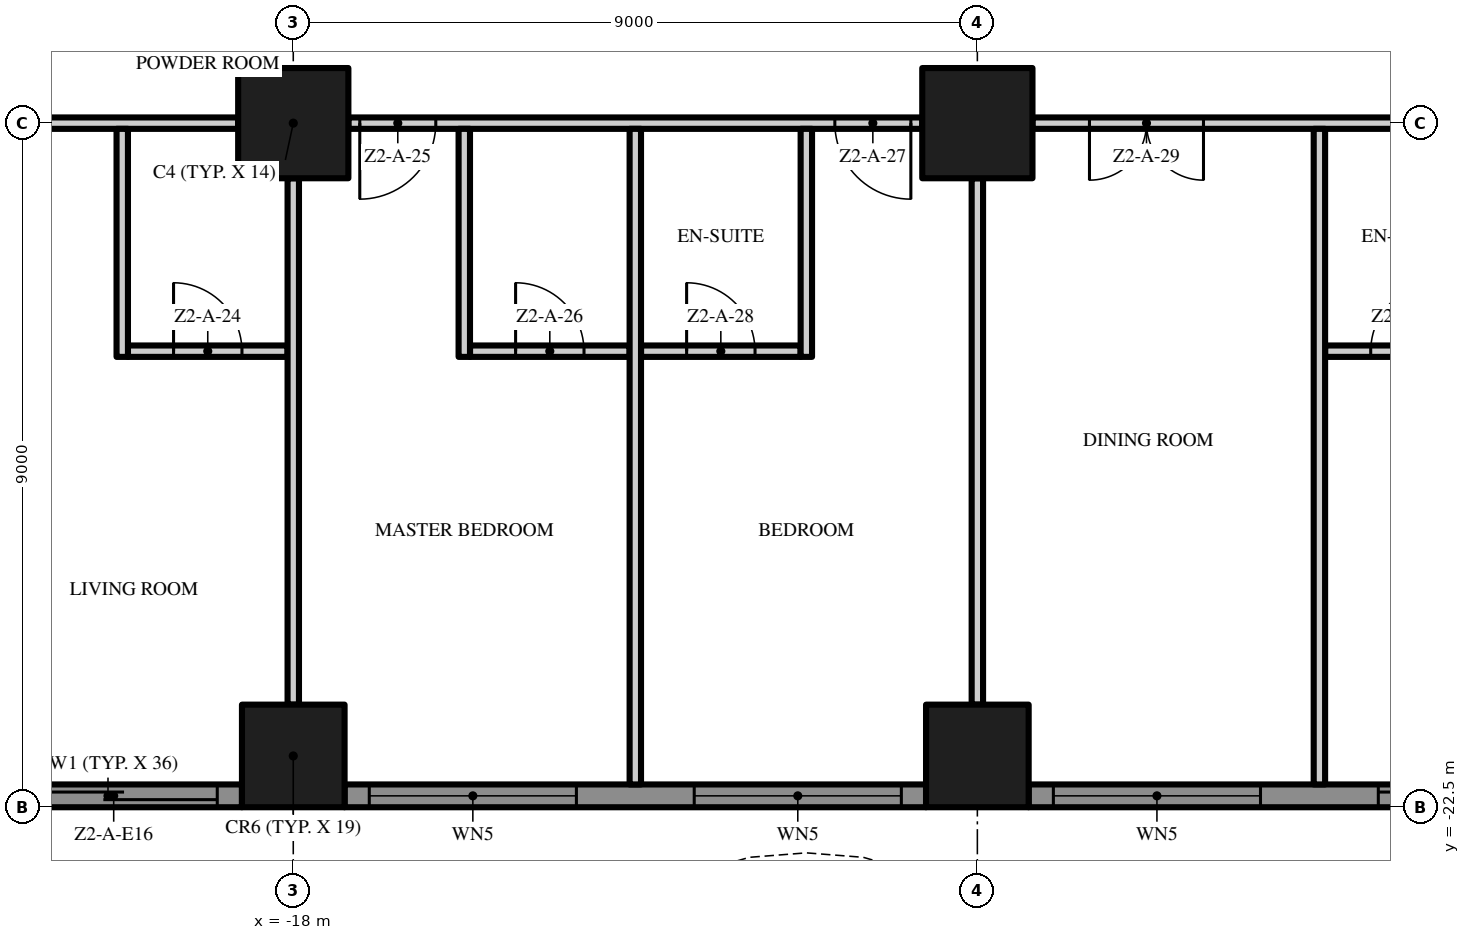
"""IFC4 building model, lengths in metres.
Left out: names, types, materials, properties, quantities, classifications, styles, units other than length and angle.
Written with IfcOpenShell. Run it as: python <this file> out.ifc"""

import sys

from ifc_helpers import new_model, si_unit, direction, frame, frame_2d, origin, origin_2d, place, context, subcontext, project, spatial, polyline, rectangle, outline, extrude, element, fill, save


model = new_model("IFC4")
c1 = context("Model", 3, precision=1e-05, world=origin(), true_north=direction((0.0, 1.0)))
c2 = subcontext(c1, "Body", "Model", "MODEL_VIEW")
j1 = project(units=[si_unit("LENGTHUNIT", "METRE"), si_unit("PLANEANGLEUNIT", "RADIAN")], contexts=[c1])
p1 = place(None, origin())
s1 = spatial("IfcSite", under=j1, at=p1, CompositionType="ELEMENT")
p2 = place(p1, origin())
s2 = spatial("IfcBuilding", under=s1, at=p2, CompositionType="ELEMENT")
p3 = place(p2, frame((0.0, 0.0, 77.0)))
s3 = spatial("IfcBuildingStorey", under=s2, at=p3, CompositionType="ELEMENT", Elevation=77.0)
p4 = place(p3, frame((-18.0, -13.5, 0.0), z_axis=(0.0, 0.0, 1.0), x_axis=(1.0, 0.0, 0.0)))
e1 = element("IfcColumn", 1, at=p4, inside=s3, PredefinedType="COLUMN", context=c2, shape_type="SweptSolid", body=[
    extrude(rectangle(XDim=1.45, YDim=1.45, at=origin_2d()), origin(), (0.0, 0.0, 1.0), 3.5),
])
p5 = place(p3, frame((-18.0, -21.825, 0.0), z_axis=(0.0, 0.0, 1.0), x_axis=(1.0, 0.0, 0.0)))
e2 = element("IfcColumn", 2, at=p5, inside=s3, PredefinedType="COLUMN", context=c2, shape_type="SweptSolid", body=[
    extrude(rectangle(XDim=1.35, YDim=1.35, at=origin_2d()), origin(), (0.0, 0.0, 1.0), 3.5),
])
p6 = place(p3, frame((-9.0, -13.5, 0.0), z_axis=(0.0, 0.0, 1.0), x_axis=(1.0, 0.0, 0.0)))
e3 = element("IfcColumn", 3, at=p6, inside=s3, PredefinedType="COLUMN", context=c2, shape_type="SweptSolid", body=[
    extrude(rectangle(XDim=1.45, YDim=1.45, at=origin_2d()), origin(), (0.0, 0.0, 1.0), 3.5),
])
p7 = place(p3, frame((-9.0, -21.825, 0.0), z_axis=(0.0, 0.0, 1.0), x_axis=(1.0, 0.0, 0.0)))
e4 = element("IfcColumn", 4, at=p7, inside=s3, PredefinedType="COLUMN", context=c2, shape_type="SweptSolid", body=[
    extrude(rectangle(XDim=1.35, YDim=1.35, at=origin_2d()), origin(), (0.0, 0.0, 1.0), 3.5),
])
p8 = place(p3, frame((-18.675, -22.35, 0.0), z_axis=(0.0, 0.0, 1.0), x_axis=(-1.0, 0.0, 0.0)))
e5 = element("IfcWall", 5, at=p8, inside=s3, PredefinedType="SOLIDWALL", context=c2, shape_type="SweptSolid", body=[
    extrude(rectangle(XDim=3.525, YDim=0.3, at=frame_2d((1.762, 0.0))), origin(), (0.0, 0.0, 1.0), 3.5),
])
p9 = place(p8, frame((0.325, 0.0, 0.0)))
e6 = element("IfcOpeningElement", 6, at=p9, cuts=e5, PredefinedType="OPENING", context=c2, shape_type="SweptSolid", body=[
    extrude(rectangle(XDim=2.725, YDim=2.4, at=frame_2d((1.363, 1.2))), frame((0.0, 0.16, 0.0), z_axis=(0.0, -1.0, 0.0), x_axis=(1.0, 0.0, 0.0)), (0.0, 0.0, 1.0), 0.32),
])
p10 = place(p3, frame((-9.675, -22.35, 0.0), z_axis=(0.0, 0.0, 1.0), x_axis=(-1.0, 0.0, 0.0)))
e7 = element("IfcWall", 7, at=p10, inside=s3, PredefinedType="SOLIDWALL", context=c2, shape_type="SweptSolid", body=[
    extrude(rectangle(XDim=7.65, YDim=0.3, at=frame_2d((3.825, 0.0))), origin(), (0.0, 0.0, 1.0), 3.5),
])
p11 = place(p10, frame((4.6, 0.0, 0.45)))
e8 = element("IfcOpeningElement", 8, at=p11, cuts=e7, PredefinedType="OPENING", context=c2, shape_type="SweptSolid", body=[
    extrude(rectangle(XDim=2.725, YDim=2.65, at=frame_2d((1.363, 1.325))), frame((0.0, 0.16, 0.0), z_axis=(0.0, -1.0, 0.0), x_axis=(1.0, 0.0, 0.0)), (0.0, 0.0, 1.0), 0.32),
])
p12 = place(p10, frame((0.325, 0.0, 0.45)))
e9 = element("IfcOpeningElement", 9, at=p12, cuts=e7, PredefinedType="OPENING", context=c2, shape_type="SweptSolid", body=[
    extrude(rectangle(XDim=2.725, YDim=2.65, at=frame_2d((1.363, 1.325))), frame((0.0, 0.16, 0.0), z_axis=(0.0, -1.0, 0.0), x_axis=(1.0, 0.0, 0.0)), (0.0, 0.0, 1.0), 0.32),
])
p13 = place(p3, frame((-0.675, -22.35, 0.0), z_axis=(0.0, 0.0, 1.0), x_axis=(-1.0, 0.0, 0.0)))
e10 = element("IfcWall", 10, at=p13, inside=s3, PredefinedType="SOLIDWALL", context=c2, shape_type="SweptSolid", body=[
    extrude(rectangle(XDim=7.65, YDim=0.3, at=frame_2d((3.825, 0.0))), origin(), (0.0, 0.0, 1.0), 3.5),
])
p14 = place(p13, frame((4.6, 0.0, 0.45)))
e11 = element("IfcOpeningElement", 11, at=p14, cuts=e10, PredefinedType="OPENING", context=c2, shape_type="SweptSolid", body=[
    extrude(rectangle(XDim=2.725, YDim=2.65, at=frame_2d((1.363, 1.325))), frame((0.0, 0.16, 0.0), z_axis=(0.0, -1.0, 0.0), x_axis=(1.0, 0.0, 0.0)), (0.0, 0.0, 1.0), 0.32),
])
p15 = place(p13, frame((0.325, 0.0, 0.0)))
e12 = element("IfcOpeningElement", 12, at=p15, cuts=e10, PredefinedType="OPENING", context=c2, shape_type="SweptSolid", body=[
    extrude(rectangle(XDim=2.725, YDim=2.4, at=frame_2d((1.363, 1.2))), frame((0.0, 0.16, 0.0), z_axis=(0.0, -1.0, 0.0), x_axis=(1.0, 0.0, 0.0)), (0.0, 0.0, 1.0), 0.32),
])
p16 = place(p3, origin())
e13 = element("IfcWall", 13, at=p16, inside=s3, PredefinedType="USERDEFINED", context=c2, shape_type="SweptSolid", body=[
    extrude(outline(polyline([(-22.5, -24.3), (-21.0, -25.005), (-19.5, -25.441), (-18.75, -25.5), (-18.0, -25.441), (-16.5, -25.005), (-15.0, -24.3), (-13.5, -23.595), (-12.0, -23.159), (-11.25, -23.1), (-10.5, -23.159), (-9.0, -23.595), (-7.5, -24.3), (-6.0, -25.005), (-4.5, -25.441), (-3.75, -25.5), (-3.0, -25.441), (-1.5, -25.005), (0.0, -24.3), (1.5, -23.595), (3.0, -23.159), (3.75, -23.1), (4.5, -23.159), (6.0, -23.595), (7.5, -24.3), (9.0, -25.005), (10.5, -25.441), (11.25, -25.5), (12.0, -25.441), (13.5, -25.005), (15.0, -24.3), (16.5, -23.595), (18.0, -23.159), (18.75, -23.1), (19.5, -23.159), (21.0, -23.595), (22.5, -24.3), (22.606, -24.074), (21.089, -23.36), (19.545, -22.911), (18.75, -22.849), (17.955, -22.911), (16.411, -23.36), (14.894, -24.074), (13.411, -24.771), (11.955, -25.194), (11.25, -25.249), (10.545, -25.194), (9.089, -24.771), (7.606, -24.074), (6.089, -23.36), (4.545, -22.911), (3.75, -22.849), (2.955, -22.911), (1.411, -23.36), (-0.106, -24.074), (-1.589, -24.771), (-3.045, -25.194), (-3.75, -25.249), (-4.455, -25.194), (-5.911, -24.771), (-7.394, -24.074), (-8.911, -23.36), (-10.455, -22.911), (-11.25, -22.849), (-12.045, -22.911), (-13.589, -23.36), (-15.106, -24.074), (-16.589, -24.771), (-18.045, -25.194), (-18.75, -25.249), (-19.455, -25.194), (-20.911, -24.771), (-22.394, -24.074), (-22.5, -24.3)])), origin(), (0.0, 0.0, 1.0), 0.9),
])
p17 = place(p3, frame((-20.175, -16.5, 0.0), z_axis=(0.0, 0.0, 1.0), x_axis=(1.0, 0.0, 0.0)))
e14 = element("IfcWall", 14, at=p17, inside=s3, PredefinedType="PARTITIONING", context=c2, shape_type="SweptSolid", body=[
    extrude(rectangle(XDim=2.1, YDim=0.15, at=frame_2d((1.05, 0.0))), origin(), (0.0, 0.0, 1.0), 3.5),
])
p18 = place(p17, frame((0.6, 0.0, 0.0)))
e15 = element("IfcOpeningElement", 15, at=p18, cuts=e14, PredefinedType="OPENING", context=c2, shape_type="SweptSolid", body=[
    extrude(rectangle(XDim=0.9, YDim=2.1, at=frame_2d((0.45, 1.05))), frame((0.0, 0.085, 0.0), z_axis=(0.0, -1.0, 0.0), x_axis=(1.0, 0.0, 0.0)), (0.0, 0.0, 1.0), 0.17),
])
p19 = place(p3, frame((-15.675, -16.5, 0.0), z_axis=(0.0, 0.0, 1.0), x_axis=(1.0, 0.0, 0.0)))
e16 = element("IfcWall", 16, at=p19, inside=s3, PredefinedType="PARTITIONING", context=c2, shape_type="SweptSolid", body=[
    extrude(rectangle(XDim=2.1, YDim=0.15, at=frame_2d((1.05, 0.0))), origin(), (0.0, 0.0, 1.0), 3.5),
])
p20 = place(p19, frame((0.6, 0.0, 0.0)))
e17 = element("IfcOpeningElement", 17, at=p20, cuts=e16, PredefinedType="OPENING", context=c2, shape_type="SweptSolid", body=[
    extrude(rectangle(XDim=0.9, YDim=2.1, at=frame_2d((0.45, 1.05))), frame((0.0, 0.085, 0.0), z_axis=(0.0, -1.0, 0.0), x_axis=(1.0, 0.0, 0.0)), (0.0, 0.0, 1.0), 0.17),
])
p21 = place(p3, frame((-13.425, -16.5, 0.0), z_axis=(0.0, 0.0, 1.0), x_axis=(1.0, 0.0, 0.0)))
e18 = element("IfcWall", 18, at=p21, inside=s3, PredefinedType="PARTITIONING", context=c2, shape_type="SweptSolid", body=[
    extrude(rectangle(XDim=2.1, YDim=0.15, at=frame_2d((1.05, 0.0))), origin(), (0.0, 0.0, 1.0), 3.5),
])
p22 = place(p21, frame((0.6, 0.0, 0.0)))
e19 = element("IfcOpeningElement", 19, at=p22, cuts=e18, PredefinedType="OPENING", context=c2, shape_type="SweptSolid", body=[
    extrude(rectangle(XDim=0.9, YDim=2.1, at=frame_2d((0.45, 1.05))), frame((0.0, 0.085, 0.0), z_axis=(0.0, -1.0, 0.0), x_axis=(1.0, 0.0, 0.0)), (0.0, 0.0, 1.0), 0.17),
])
p23 = place(p3, frame((-4.425, -16.5, 0.0), z_axis=(0.0, 0.0, 1.0), x_axis=(1.0, 0.0, 0.0)))
e20 = element("IfcWall", 20, at=p23, inside=s3, PredefinedType="PARTITIONING", context=c2, shape_type="SweptSolid", body=[
    extrude(rectangle(XDim=2.1, YDim=0.15, at=frame_2d((1.05, 0.0))), origin(), (0.0, 0.0, 1.0), 3.5),
])
p24 = place(p23, frame((0.6, 0.0, 0.0)))
e21 = element("IfcOpeningElement", 21, at=p24, cuts=e20, PredefinedType="OPENING", context=c2, shape_type="SweptSolid", body=[
    extrude(rectangle(XDim=0.9, YDim=2.1, at=frame_2d((0.45, 1.05))), frame((0.0, 0.085, 0.0), z_axis=(0.0, -1.0, 0.0), x_axis=(1.0, 0.0, 0.0)), (0.0, 0.0, 1.0), 0.17),
])
p25 = place(p3, frame((-18.725, -13.5, 0.0), z_axis=(0.0, 0.0, 1.0), x_axis=(-1.0, 0.0, 0.0)))
e22 = element("IfcWall", 22, at=p25, inside=s3, PredefinedType="PARTITIONING", context=c2, shape_type="SweptSolid", body=[
    extrude(rectangle(XDim=6.925, YDim=0.15, at=frame_2d((3.462, 0.0))), origin(), (0.0, 0.0, 1.0), 3.5),
])
p26 = place(p25, frame((4.025, 0.0, 0.0)))
e23 = element("IfcOpeningElement", 23, at=p26, cuts=e22, PredefinedType="OPENING", context=c2, shape_type="SweptSolid", body=[
    extrude(rectangle(XDim=1.8, YDim=2.4, at=frame_2d((0.9, 1.2))), frame((0.0, 0.085, 0.0), z_axis=(0.0, -1.0, 0.0), x_axis=(1.0, 0.0, 0.0)), (0.0, 0.0, 1.0), 0.17),
])
p27 = place(p3, frame((-9.725, -13.5, 0.0), z_axis=(0.0, 0.0, 1.0), x_axis=(-1.0, 0.0, 0.0)))
e24 = element("IfcWall", 24, at=p27, inside=s3, PredefinedType="PARTITIONING", context=c2, shape_type="SweptSolid", body=[
    extrude(rectangle(XDim=7.55, YDim=0.15, at=frame_2d((3.775, 0.0))), origin(), (0.0, 0.0, 1.0), 3.5),
])
p28 = place(p27, frame((6.4, 0.0, 0.0)))
e25 = element("IfcOpeningElement", 25, at=p28, cuts=e24, PredefinedType="OPENING", context=c2, shape_type="SweptSolid", body=[
    extrude(rectangle(XDim=1.0, YDim=2.4, at=frame_2d((0.5, 1.2))), frame((0.0, 0.085, 0.0), z_axis=(0.0, -1.0, 0.0), x_axis=(1.0, 0.0, 0.0)), (0.0, 0.0, 1.0), 0.17),
])
p29 = place(p27, frame((0.15, 0.0, 0.0)))
e26 = element("IfcOpeningElement", 26, at=p29, cuts=e24, PredefinedType="OPENING", context=c2, shape_type="SweptSolid", body=[
    extrude(rectangle(XDim=1.0, YDim=2.4, at=frame_2d((0.5, 1.2))), frame((0.0, 0.085, 0.0), z_axis=(0.0, -1.0, 0.0), x_axis=(1.0, 0.0, 0.0)), (0.0, 0.0, 1.0), 0.17),
])
p30 = place(p3, frame((-0.725, -13.5, 0.0), z_axis=(0.0, 0.0, 1.0), x_axis=(-1.0, 0.0, 0.0)))
e27 = element("IfcWall", 27, at=p30, inside=s3, PredefinedType="PARTITIONING", context=c2, shape_type="SweptSolid", body=[
    extrude(rectangle(XDim=7.55, YDim=0.15, at=frame_2d((3.775, 0.0))), origin(), (0.0, 0.0, 1.0), 3.5),
])
p31 = place(p30, frame((5.3, 0.0, 0.0)))
e28 = element("IfcOpeningElement", 28, at=p31, cuts=e27, PredefinedType="OPENING", context=c2, shape_type="SweptSolid", body=[
    extrude(rectangle(XDim=1.5, YDim=2.4, at=frame_2d((0.75, 1.2))), frame((0.0, 0.085, 0.0), z_axis=(0.0, -1.0, 0.0), x_axis=(1.0, 0.0, 0.0)), (0.0, 0.0, 1.0), 0.17),
])
p32 = place(p30, frame((0.15, 0.0, 0.0)))
e29 = element("IfcOpeningElement", 29, at=p32, cuts=e27, PredefinedType="OPENING", context=c2, shape_type="SweptSolid", body=[
    extrude(rectangle(XDim=1.0, YDim=2.4, at=frame_2d((0.5, 1.2))), frame((0.0, 0.085, 0.0), z_axis=(0.0, -1.0, 0.0), x_axis=(1.0, 0.0, 0.0)), (0.0, 0.0, 1.0), 0.17),
])
p33 = place(p3, frame((-20.25, -16.575, 0.0), z_axis=(0.0, 0.0, 1.0), x_axis=(0.0, 1.0, 0.0)))
e30 = element("IfcWall", 30, at=p33, inside=s3, PredefinedType="PARTITIONING", context=c2, shape_type="SweptSolid", body=[
    extrude(rectangle(XDim=3.0, YDim=0.15, at=frame_2d((1.5, 0.0))), origin(), (0.0, 0.0, 1.0), 3.5),
])
p34 = place(p3, frame((-18.0, -21.15, 0.0), z_axis=(0.0, 0.0, 1.0), x_axis=(0.0, 1.0, 0.0)))
e31 = element("IfcWall", 31, at=p34, inside=s3, PredefinedType="PARTITIONING", context=c2, shape_type="SweptSolid", body=[
    extrude(rectangle(XDim=6.925, YDim=0.15, at=frame_2d((3.462, 0.0))), origin(), (0.0, 0.0, 1.0), 3.5),
])
p35 = place(p3, frame((-15.75, -16.575, 0.0), z_axis=(0.0, 0.0, 1.0), x_axis=(0.0, 1.0, 0.0)))
e32 = element("IfcWall", 32, at=p35, inside=s3, PredefinedType="PARTITIONING", context=c2, shape_type="SweptSolid", body=[
    extrude(rectangle(XDim=3.0, YDim=0.15, at=frame_2d((1.5, 0.0))), origin(), (0.0, 0.0, 1.0), 3.5),
])
p36 = place(p3, frame((-13.5, -22.2, 0.0), z_axis=(0.0, 0.0, 1.0), x_axis=(0.0, 1.0, 0.0)))
e33 = element("IfcWall", 33, at=p36, inside=s3, PredefinedType="PARTITIONING", context=c2, shape_type="SweptSolid", body=[
    extrude(rectangle(XDim=8.625, YDim=0.15, at=frame_2d((4.312, 0.0))), origin(), (0.0, 0.0, 1.0), 3.5),
])
p37 = place(p3, frame((-11.25, -16.575, 0.0), z_axis=(0.0, 0.0, 1.0), x_axis=(0.0, 1.0, 0.0)))
e34 = element("IfcWall", 34, at=p37, inside=s3, PredefinedType="PARTITIONING", context=c2, shape_type="SweptSolid", body=[
    extrude(rectangle(XDim=3.0, YDim=0.15, at=frame_2d((1.5, 0.0))), origin(), (0.0, 0.0, 1.0), 3.5),
])
p38 = place(p3, frame((-9.0, -21.15, 0.0), z_axis=(0.0, 0.0, 1.0), x_axis=(0.0, 1.0, 0.0)))
e35 = element("IfcWall", 35, at=p38, inside=s3, PredefinedType="PARTITIONING", context=c2, shape_type="SweptSolid", body=[
    extrude(rectangle(XDim=6.925, YDim=0.15, at=frame_2d((3.462, 0.0))), origin(), (0.0, 0.0, 1.0), 3.5),
])
p39 = place(p3, frame((-4.5, -22.2, 0.0), z_axis=(0.0, 0.0, 1.0), x_axis=(0.0, 1.0, 0.0)))
e36 = element("IfcWall", 36, at=p39, inside=s3, PredefinedType="PARTITIONING", context=c2, shape_type="SweptSolid", body=[
    extrude(rectangle(XDim=8.625, YDim=0.15, at=frame_2d((4.312, 0.0))), origin(), (0.0, 0.0, 1.0), 3.5),
])
p40 = place(p9, origin())
e37 = element("IfcDoor", 37, at=p40, inside=s3, OperationType="SINGLE_SWING_LEFT", PredefinedType="DOOR", context=c2, shape_type="SweptSolid", body=[
    extrude(rectangle(XDim=2.725, YDim=2.4, at=frame_2d((1.363, 1.2))), frame((0.0, 0.025, 0.0), z_axis=(0.0, -1.0, 0.0), x_axis=(1.0, 0.0, 0.0)), (0.0, 0.0, 1.0), 0.05),
])
fill(e6, e37)
p41 = place(p11, origin())
e38 = element("IfcWindow", 38, at=p41, inside=s3, PartitioningType="SINGLE_PANEL", PredefinedType="WINDOW", context=c2, shape_type="SweptSolid", body=[
    extrude(rectangle(XDim=2.725, YDim=2.65, at=frame_2d((1.363, 1.325))), frame((0.0, 0.03, 0.0), z_axis=(0.0, -1.0, 0.0), x_axis=(1.0, 0.0, 0.0)), (0.0, 0.0, 1.0), 0.06),
])
fill(e8, e38)
p42 = place(p12, origin())
e39 = element("IfcWindow", 39, at=p42, inside=s3, PartitioningType="SINGLE_PANEL", PredefinedType="WINDOW", context=c2, shape_type="SweptSolid", body=[
    extrude(rectangle(XDim=2.725, YDim=2.65, at=frame_2d((1.363, 1.325))), frame((0.0, 0.03, 0.0), z_axis=(0.0, -1.0, 0.0), x_axis=(1.0, 0.0, 0.0)), (0.0, 0.0, 1.0), 0.06),
])
fill(e9, e39)
p43 = place(p14, origin())
e40 = element("IfcWindow", 40, at=p43, inside=s3, PartitioningType="SINGLE_PANEL", PredefinedType="WINDOW", context=c2, shape_type="SweptSolid", body=[
    extrude(rectangle(XDim=2.725, YDim=2.65, at=frame_2d((1.363, 1.325))), frame((0.0, 0.03, 0.0), z_axis=(0.0, -1.0, 0.0), x_axis=(1.0, 0.0, 0.0)), (0.0, 0.0, 1.0), 0.06),
])
fill(e11, e40)
p44 = place(p15, origin())
e41 = element("IfcDoor", 41, at=p44, inside=s3, OperationType="SINGLE_SWING_LEFT", PredefinedType="DOOR", context=c2, shape_type="SweptSolid", body=[
    extrude(rectangle(XDim=2.725, YDim=2.4, at=frame_2d((1.363, 1.2))), frame((0.0, 0.025, 0.0), z_axis=(0.0, -1.0, 0.0), x_axis=(1.0, 0.0, 0.0)), (0.0, 0.0, 1.0), 0.05),
])
fill(e12, e41)
p45 = place(p18, origin())
e42 = element("IfcDoor", 42, at=p45, inside=s3, OperationType="SINGLE_SWING_LEFT", PredefinedType="DOOR", context=c2, shape_type="SweptSolid", body=[
    extrude(rectangle(XDim=0.9, YDim=2.1, at=frame_2d((0.45, 1.05))), frame((0.0, 0.025, 0.0), z_axis=(0.0, -1.0, 0.0), x_axis=(1.0, 0.0, 0.0)), (0.0, 0.0, 1.0), 0.05),
])
fill(e15, e42)
p46 = place(p28, origin())
e43 = element("IfcDoor", 43, at=p46, inside=s3, OperationType="SINGLE_SWING_RIGHT", PredefinedType="DOOR", context=c2, shape_type="SweptSolid", body=[
    extrude(rectangle(XDim=1.0, YDim=2.4, at=frame_2d((0.5, 1.2))), frame((0.0, 0.025, 0.0), z_axis=(0.0, -1.0, 0.0), x_axis=(1.0, 0.0, 0.0)), (0.0, 0.0, 1.0), 0.05),
])
fill(e25, e43)
p47 = place(p20, origin())
e44 = element("IfcDoor", 44, at=p47, inside=s3, OperationType="SINGLE_SWING_LEFT", PredefinedType="DOOR", context=c2, shape_type="SweptSolid", body=[
    extrude(rectangle(XDim=0.9, YDim=2.1, at=frame_2d((0.45, 1.05))), frame((0.0, 0.025, 0.0), z_axis=(0.0, -1.0, 0.0), x_axis=(1.0, 0.0, 0.0)), (0.0, 0.0, 1.0), 0.05),
])
fill(e17, e44)
p48 = place(p29, origin())
e45 = element("IfcDoor", 45, at=p48, inside=s3, OperationType="SINGLE_SWING_LEFT", PredefinedType="DOOR", context=c2, shape_type="SweptSolid", body=[
    extrude(rectangle(XDim=1.0, YDim=2.4, at=frame_2d((0.5, 1.2))), frame((0.0, 0.025, 0.0), z_axis=(0.0, -1.0, 0.0), x_axis=(1.0, 0.0, 0.0)), (0.0, 0.0, 1.0), 0.05),
])
fill(e26, e45)
p49 = place(p22, origin())
e46 = element("IfcDoor", 46, at=p49, inside=s3, OperationType="SINGLE_SWING_LEFT", PredefinedType="DOOR", context=c2, shape_type="SweptSolid", body=[
    extrude(rectangle(XDim=0.9, YDim=2.1, at=frame_2d((0.45, 1.05))), frame((0.0, 0.025, 0.0), z_axis=(0.0, -1.0, 0.0), x_axis=(1.0, 0.0, 0.0)), (0.0, 0.0, 1.0), 0.05),
])
fill(e19, e46)
p50 = place(p31, origin())
e47 = element("IfcDoor", 47, at=p50, inside=s3, OperationType="DOUBLE_DOOR_SINGLE_SWING", PredefinedType="DOOR", context=c2, shape_type="SweptSolid", body=[
    extrude(rectangle(XDim=1.5, YDim=2.4, at=frame_2d((0.75, 1.2))), frame((0.0, 0.025, 0.0), z_axis=(0.0, -1.0, 0.0), x_axis=(1.0, 0.0, 0.0)), (0.0, 0.0, 1.0), 0.05),
])
fill(e28, e47)
p51 = place(p24, origin())
e48 = element("IfcDoor", 48, at=p51, inside=s3, OperationType="SINGLE_SWING_RIGHT", PredefinedType="DOOR", context=c2, shape_type="SweptSolid", body=[
    extrude(rectangle(XDim=0.9, YDim=2.1, at=frame_2d((0.45, 1.05))), frame((0.0, 0.025, 0.0), z_axis=(0.0, -1.0, 0.0), x_axis=(1.0, 0.0, 0.0)), (0.0, 0.0, 1.0), 0.05),
])
fill(e21, e48)
save(model, sys.argv[1])
